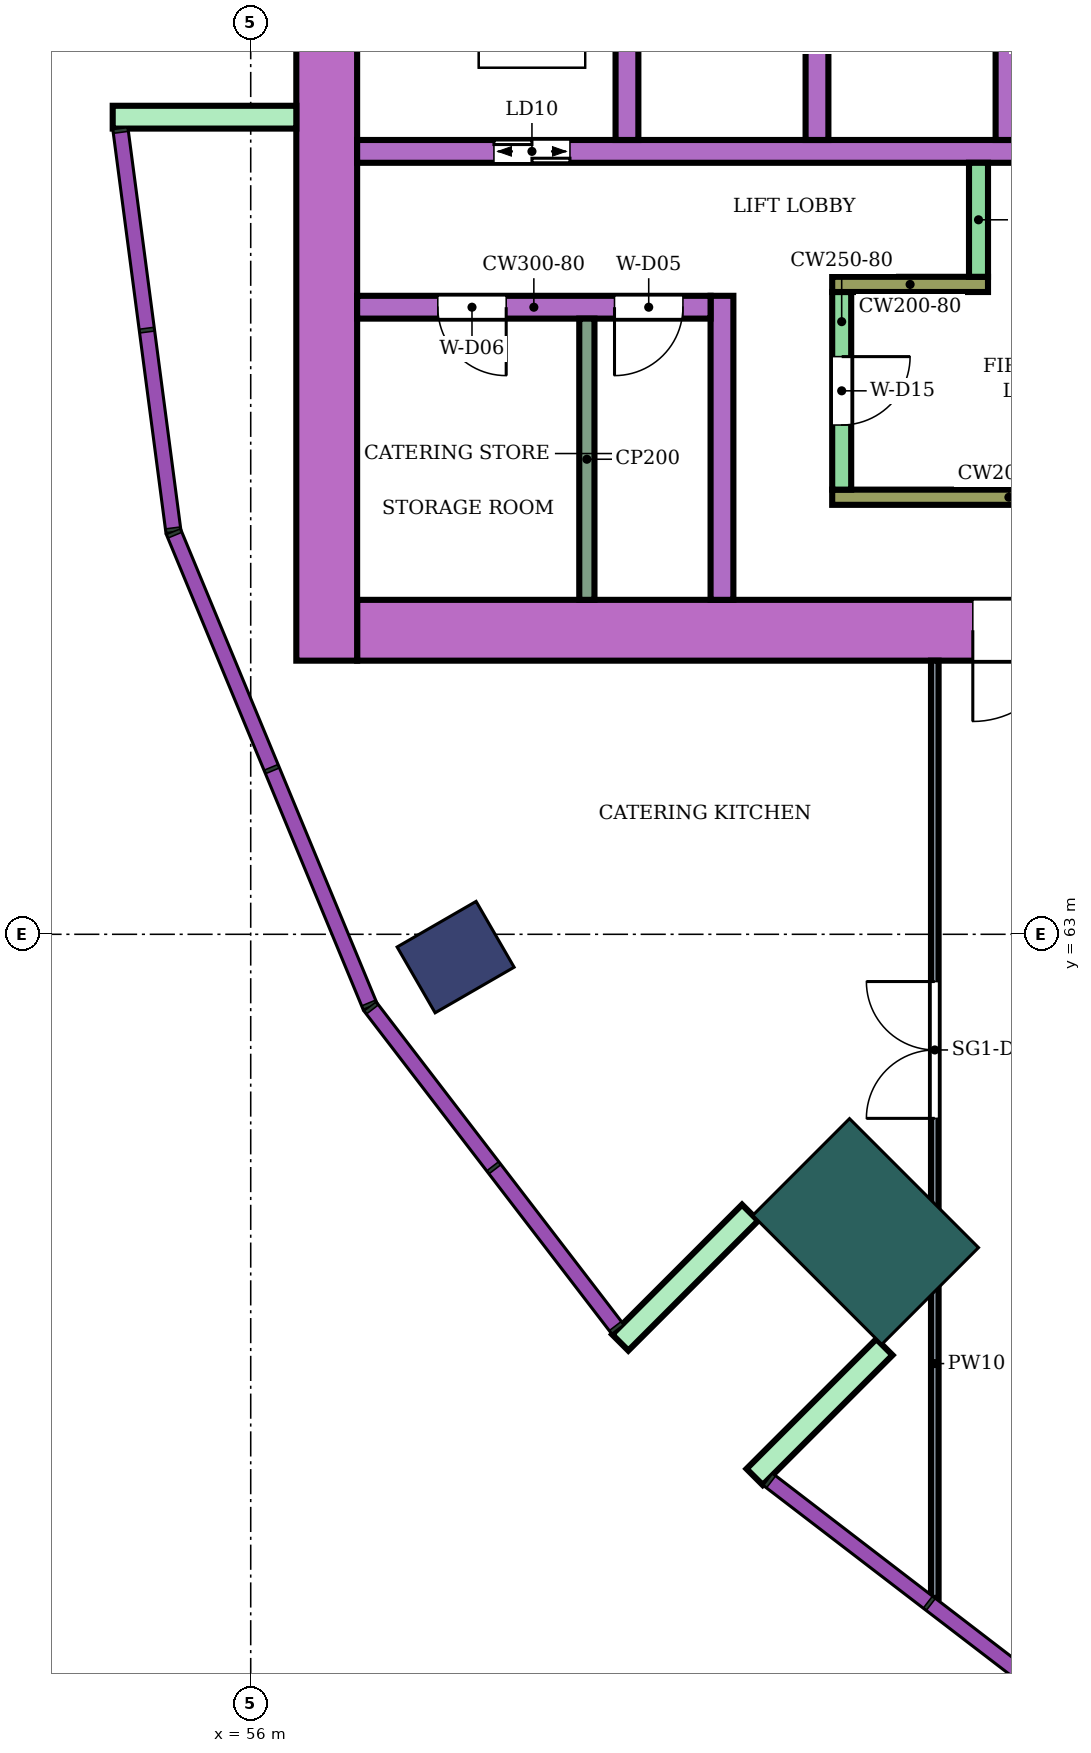
"""IFC4 building model, lengths in metres.
Left out: names, types, materials, properties, quantities, classifications, styles, units other than length and angle.
Written with IfcOpenShell. Run it as: python <this file> out.ifc"""

import sys

from ifc_helpers import new_model, si_unit, direction, frame, frame_2d, origin, origin_2d, place, context, subcontext, project, spatial, rectangle, extrude, element, fill, save


model = new_model("IFC4")
c1 = context("Model", 3, precision=1e-05, world=origin(), true_north=direction((0.0, 1.0)))
c2 = subcontext(c1, "Body", "Model", "MODEL_VIEW")
j1 = project(units=[si_unit("LENGTHUNIT", "METRE"), si_unit("PLANEANGLEUNIT", "RADIAN")], contexts=[c1])
p1 = place(None, origin())
s1 = spatial("IfcSite", under=j1, at=p1, CompositionType="ELEMENT")
p2 = place(p1, origin())
s2 = spatial("IfcBuilding", under=s1, at=p2, CompositionType="ELEMENT")
p3 = place(p2, frame((0.0, 0.0, 74.4)))
s3 = spatial("IfcBuildingStorey", under=s2, at=p3, CompositionType="ELEMENT", Elevation=74.4)
p4 = place(p3, frame((58.696, 62.7, 0.0), z_axis=(0.0, 0.0, 1.0), x_axis=(-0.866025403784, -0.5, 0.0)))
e1 = element("IfcColumn", 1, at=p4, inside=s3, PredefinedType="COLUMN", context=c2, shape_type="SweptSolid", body=[
    extrude(rectangle(XDim=1.2, YDim=1.0, at=origin_2d()), origin(), (0.0, 0.0, 1.0), 8.0),
])
p5 = place(p3, frame((64.09, 59.09, 0.0), z_axis=(0.0, 0.0, 1.0), x_axis=(-0.707106781187, -0.707106781187, 0.0)))
e2 = element("IfcColumn", 2, at=p5, inside=s3, PredefinedType="COLUMN", context=c2, shape_type="SweptSolid", body=[
    extrude(rectangle(XDim=1.8, YDim=2.4, at=origin_2d()), origin(), (0.0, 0.0, 1.0), 8.0),
])
p6 = place(p3, frame((72.1, 67.0, 0.0), z_axis=(0.0, 0.0, 1.0), x_axis=(-1.0, 0.0, 0.0)))
e3 = element("IfcWall", 3, at=p6, inside=s3, PredefinedType="SHEAR", context=c2, shape_type="SweptSolid", body=[
    extrude(rectangle(XDim=14.7, YDim=0.8, at=frame_2d((7.35, 0.0))), origin(), (0.0, 0.0, 1.0), 7.68),
])
p7 = place(p6, frame((4.2, 0.0, 0.0)))
e4 = element("IfcOpeningElement", 4, at=p7, cuts=e3, PredefinedType="OPENING", context=c2, shape_type="SweptSolid", body=[
    extrude(rectangle(XDim=2.4, YDim=2.4, at=frame_2d((1.2, 1.2))), frame((0.0, 0.41, 0.0), z_axis=(0.0, -1.0, 0.0), x_axis=(1.0, 0.0, 0.0)), (0.0, 0.0, 1.0), 0.82),
])
p8 = place(p3, frame((57.0, 83.4, 0.0), z_axis=(0.0, 0.0, 1.0), x_axis=(0.0, -1.0, 0.0)))
e5 = element("IfcWall", 5, at=p8, inside=s3, PredefinedType="SHEAR", context=c2, shape_type="SweptSolid", body=[
    extrude(rectangle(XDim=16.8, YDim=0.8, at=frame_2d((8.4, 0.0))), origin(), (0.0, 0.0, 1.0), 7.68),
])
p9 = place(p3, frame((68.3, 73.3, 0.0), z_axis=(0.0, 0.0, 1.0), x_axis=(-1.0, 0.0, 0.0)))
e6 = element("IfcWall", 6, at=p9, inside=s3, PredefinedType="SHEAR", context=c2, shape_type="SweptSolid", body=[
    extrude(rectangle(XDim=10.9, YDim=0.3, at=frame_2d((5.45, 0.0))), origin(), (0.0, 0.0, 1.0), 7.68),
])
p10 = place(p9, frame((0.55, 0.0, 0.0)))
e7 = element("IfcOpeningElement", 7, at=p10, cuts=e6, PredefinedType="OPENING", context=c2, shape_type="SweptSolid", body=[
    extrude(rectangle(XDim=1.1, YDim=2.1, at=frame_2d((0.55, 1.05))), frame((0.0, 0.16, 0.0), z_axis=(0.0, -1.0, 0.0), x_axis=(1.0, 0.0, 0.0)), (0.0, 0.0, 1.0), 0.32),
])
p11 = place(p9, frame((8.1, 0.0, 0.0)))
e8 = element("IfcOpeningElement", 8, at=p11, cuts=e6, PredefinedType="OPENING", context=c2, shape_type="SweptSolid", body=[
    extrude(rectangle(XDim=1.0, YDim=2.1, at=frame_2d((0.5, 1.05))), frame((0.0, 0.16, 0.0), z_axis=(0.0, -1.0, 0.0), x_axis=(1.0, 0.0, 0.0)), (0.0, 0.0, 1.0), 0.32),
])
for number, where, z_axis, x_axis in (
    (9, (65.95, 76.0, 0.0), (0.0, 0.0, 1.0), (0.0, -1.0, 0.0)),
    (10, (63.45, 76.0, 0.0), (0.0, 0.0, 1.0), (0.0, -1.0, 0.0)),
    (11, (60.95, 76.0, 0.0), (0.0, 0.0, 1.0), (0.0, -1.0, 0.0)),
):
    element("IfcWall", number, at=place(p3, frame(where, z_axis=z_axis, x_axis=x_axis)), inside=s3, PredefinedType="SHEAR", context=c2, shape_type="SweptSolid", body=[
        extrude(rectangle(XDim=2.55, YDim=0.3, at=frame_2d((1.275, 0.0))), origin(), (0.0, 0.0, 1.0), 7.68),
    ])
p12 = place(p3, frame((68.3, 68.75, 0.0), z_axis=(0.0, 0.0, 1.0), x_axis=(-1.0, 0.0, 0.0)))
e12 = element("IfcWall", 12, at=p12, inside=s3, PredefinedType="SHEAR", context=c2, shape_type="SweptSolid", body=[
    extrude(rectangle(XDim=4.65, YDim=0.2, at=frame_2d((2.325, 0.0))), origin(), (0.0, 0.0, 1.0), 7.68),
])
p13 = place(p3, frame((63.775, 71.45, 0.0), z_axis=(0.0, 0.0, 1.0), x_axis=(0.0, -1.0, 0.0)))
e13 = element("IfcWall", 13, at=p13, inside=s3, PredefinedType="SHEAR", context=c2, shape_type="SweptSolid", body=[
    extrude(rectangle(XDim=2.6, YDim=0.25, at=frame_2d((1.3, 0.0))), origin(), (0.0, 0.0, 1.0), 7.68),
])
p14 = place(p13, frame((0.85, 0.0, 0.0)))
e14 = element("IfcOpeningElement", 14, at=p14, cuts=e13, PredefinedType="OPENING", context=c2, shape_type="SweptSolid", body=[
    extrude(rectangle(XDim=0.9, YDim=2.1, at=frame_2d((0.45, 1.05))), frame((0.0, 0.135, 0.0), z_axis=(0.0, -1.0, 0.0), x_axis=(1.0, 0.0, 0.0)), (0.0, 0.0, 1.0), 0.27),
])
p15 = place(p3, frame((65.7, 71.55, 0.0), z_axis=(0.0, 0.0, 1.0), x_axis=(-1.0, 0.0, 0.0)))
e15 = element("IfcWall", 15, at=p15, inside=s3, PredefinedType="SHEAR", context=c2, shape_type="SweptSolid", body=[
    extrude(rectangle(XDim=2.05, YDim=0.2, at=frame_2d((1.025, 0.0))), origin(), (0.0, 0.0, 1.0), 7.68),
])
p16 = place(p3, frame((65.575, 73.15, 0.0), z_axis=(0.0, 0.0, 1.0), x_axis=(0.0, -1.0, 0.0)))
e16 = element("IfcWall", 16, at=p16, inside=s3, PredefinedType="SHEAR", context=c2, shape_type="SweptSolid", body=[
    extrude(rectangle(XDim=1.5, YDim=0.25, at=frame_2d((0.75, 0.0))), origin(), (0.0, 0.0, 1.0), 7.68),
])
p17 = place(p3, frame((62.2, 71.4, 0.0), z_axis=(0.0, 0.0, 1.0), x_axis=(0.0, -1.0, 0.0)))
e17 = element("IfcWall", 17, at=p17, inside=s3, PredefinedType="SHEAR", context=c2, shape_type="SweptSolid", body=[
    extrude(rectangle(XDim=4.0, YDim=0.3, at=frame_2d((2.0, 0.0))), origin(), (0.0, 0.0, 1.0), 7.68),
])
p18 = place(p3, frame((62.05, 71.25, 0.0), z_axis=(0.0, 0.0, 1.0), x_axis=(-1.0, 0.0, 0.0)))
e18 = element("IfcWall", 18, at=p18, inside=s3, PredefinedType="SHEAR", context=c2, shape_type="SweptSolid", body=[
    extrude(rectangle(XDim=4.65, YDim=0.3, at=frame_2d((2.325, 0.0))), origin(), (0.0, 0.0, 1.0), 7.68),
])
p19 = place(p18, frame((0.364, 0.0, 0.0)))
e19 = element("IfcOpeningElement", 19, at=p19, cuts=e18, PredefinedType="OPENING", context=c2, shape_type="SweptSolid", body=[
    extrude(rectangle(XDim=0.9, YDim=2.1, at=frame_2d((0.45, 1.05))), frame((0.0, 0.16, 0.0), z_axis=(0.0, -1.0, 0.0), x_axis=(1.0, 0.0, 0.0)), (0.0, 0.0, 1.0), 0.32),
])
p20 = place(p18, frame((2.689, 0.0, 0.0)))
e20 = element("IfcOpeningElement", 20, at=p20, cuts=e18, PredefinedType="OPENING", context=c2, shape_type="SweptSolid", body=[
    extrude(rectangle(XDim=0.9, YDim=2.1, at=frame_2d((0.45, 1.05))), frame((0.0, 0.16, 0.0), z_axis=(0.0, -1.0, 0.0), x_axis=(1.0, 0.0, 0.0)), (0.0, 0.0, 1.0), 0.32),
])
for number, where, z_axis, x_axis in (
    (21, (56.6, 73.75, 0.0), (0.0, 0.0, 1.0), (-1.0, 0.0, 0.0)),
    (22, (62.57, 59.338, 0.0), (0.0, 0.0, 1.0), (-0.707, -0.707, 0.0)),
    (23, (64.338, 57.57, 0.0), (0.0, 0.0, 1.0), (-0.707, -0.707, 0.0)),
):
    element("IfcWall", number, at=place(p3, frame(where, z_axis=z_axis, x_axis=x_axis)), inside=s3, PredefinedType="NOTDEFINED", context=c2, shape_type="SweptSolid", body=[
        extrude(rectangle(XDim=2.416, YDim=0.3, at=frame_2d((1.208, 0.0))), origin(), (0.0, 0.0, 1.0), 8.0),
    ])
p21 = place(p3, frame((65.0, 54.27, 0.0), z_axis=(0.0, 0.0, 1.0), x_axis=(0.0, 1.0, 0.0)))
e24 = element("IfcWall", 24, at=p21, inside=s3, PredefinedType="PARTITIONING", context=c2, shape_type="SweptSolid", body=[
    extrude(rectangle(XDim=12.33, YDim=0.1, at=frame_2d((6.165, 0.0))), origin(), (0.0, 0.0, 1.0), 7.55),
])
p22 = place(p21, frame((6.309, 0.0, 0.0)))
e25 = element("IfcOpeningElement", 25, at=p22, cuts=e24, PredefinedType="OPENING", context=c2, shape_type="SweptSolid", body=[
    extrude(rectangle(XDim=1.8, YDim=2.1, at=frame_2d((0.9, 1.05))), frame((0.0, 0.06, 0.0), z_axis=(0.0, -1.0, 0.0), x_axis=(1.0, 0.0, 0.0)), (0.0, 0.0, 1.0), 0.12),
])
p23 = place(p3, frame((60.423, 71.1, 0.0), z_axis=(0.0, 0.0, 1.0), x_axis=(0.0, -1.0, 0.0)))
e26 = element("IfcWall", 26, at=p23, inside=s3, PredefinedType="PARTITIONING", context=c2, shape_type="SweptSolid", body=[
    extrude(rectangle(XDim=3.7, YDim=0.2, at=frame_2d((1.85, 0.0))), origin(), (0.0, 0.0, 1.0), 7.68),
])
p24 = place(p22, origin())
e27 = element("IfcDoor", 27, at=p24, inside=s3, OperationType="DOUBLE_DOOR_SINGLE_SWING", PredefinedType="DOOR", context=c2, shape_type="SweptSolid", body=[
    extrude(rectangle(XDim=1.8, YDim=2.1, at=frame_2d((0.9, 1.05))), frame((0.0, 0.025, 0.0), z_axis=(0.0, -1.0, 0.0), x_axis=(1.0, 0.0, 0.0)), (0.0, 0.0, 1.0), 0.05),
])
fill(e25, e27)
p25 = place(p11, origin())
e28 = element("IfcDoor", 28, at=p25, inside=s3, OperationType="DOUBLE_DOOR_SLIDING", PredefinedType="DOOR", context=c2, shape_type="SweptSolid", body=[
    extrude(rectangle(XDim=1.0, YDim=2.1, at=frame_2d((0.5, 1.05))), frame((0.0, 0.025, 0.0), z_axis=(0.0, -1.0, 0.0), x_axis=(1.0, 0.0, 0.0)), (0.0, 0.0, 1.0), 0.05),
])
fill(e8, e28)
p26 = place(p14, origin())
e29 = element("IfcDoor", 29, at=p26, inside=s3, OperationType="SINGLE_SWING_LEFT", PredefinedType="DOOR", context=c2, shape_type="SweptSolid", body=[
    extrude(rectangle(XDim=0.9, YDim=2.1, at=frame_2d((0.45, 1.05))), frame((0.0, 0.025, 0.0), z_axis=(0.0, -1.0, 0.0), x_axis=(1.0, 0.0, 0.0)), (0.0, 0.0, 1.0), 0.05),
])
fill(e14, e29)
p27 = place(p19, origin())
e30 = element("IfcDoor", 30, at=p27, inside=s3, OperationType="SINGLE_SWING_RIGHT", PredefinedType="DOOR", context=c2, shape_type="SweptSolid", body=[
    extrude(rectangle(XDim=0.9, YDim=2.1, at=frame_2d((0.45, 1.05))), frame((0.0, 0.025, 0.0), z_axis=(0.0, -1.0, 0.0), x_axis=(1.0, 0.0, 0.0)), (0.0, 0.0, 1.0), 0.05),
])
fill(e19, e30)
p28 = place(p20, origin())
e31 = element("IfcDoor", 31, at=p28, inside=s3, OperationType="SINGLE_SWING_LEFT", PredefinedType="DOOR", context=c2, shape_type="SweptSolid", body=[
    extrude(rectangle(XDim=0.9, YDim=2.1, at=frame_2d((0.45, 1.05))), frame((0.0, 0.025, 0.0), z_axis=(0.0, -1.0, 0.0), x_axis=(1.0, 0.0, 0.0)), (0.0, 0.0, 1.0), 0.05),
])
fill(e20, e31)
p29 = place(p7, origin())
e32 = element("IfcDoor", 32, at=p29, inside=s3, OperationType="DOUBLE_DOOR_SINGLE_SWING", PredefinedType="DOOR", context=c2, shape_type="SweptSolid", body=[
    extrude(rectangle(XDim=2.4, YDim=2.4, at=frame_2d((1.2, 1.2))), frame((0.0, 0.025, 0.0), z_axis=(0.0, -1.0, 0.0), x_axis=(1.0, 0.0, 0.0)), (0.0, 0.0, 1.0), 0.05),
])
fill(e4, e32)
save(model, sys.argv[1])
